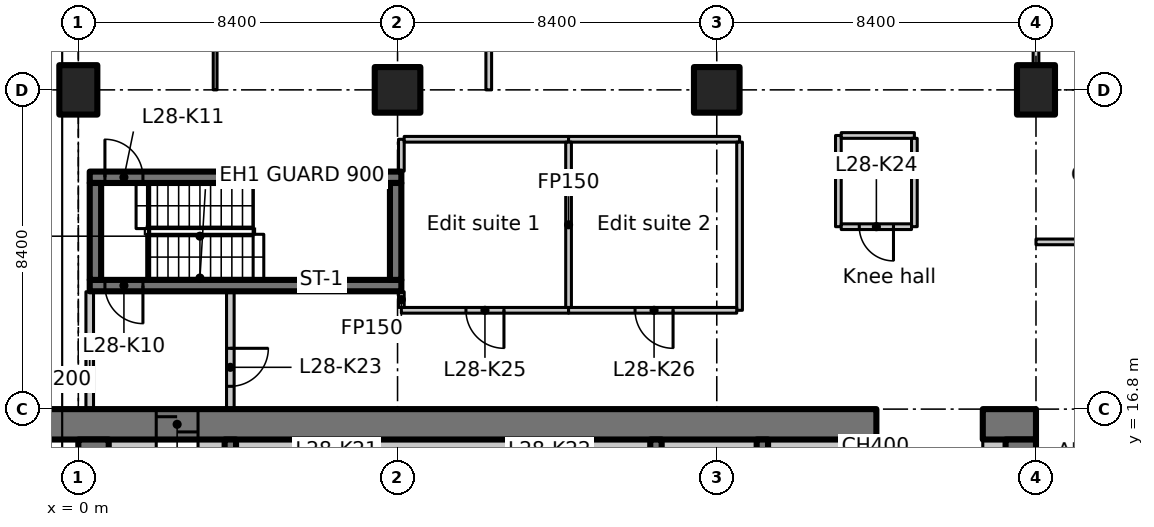
"""IFC4 building model, lengths in metres.
Left out: names, types, materials, properties, quantities, classifications, styles, units other than length and angle.
Written with IfcOpenShell. Run it as: python <this file> out.ifc"""

import sys

from ifc_helpers import new_model, si_unit, direction, frame, frame_2d, origin, origin_2d, place, context, subcontext, project, spatial, polyline, rectangle, outline, extrude, element, fill, save


model = new_model("IFC4")
c1 = context("Model", 3, precision=1e-05, world=origin(), true_north=direction((0.0, 1.0)))
c2 = subcontext(c1, "Body", "Model", "MODEL_VIEW")
j1 = project(units=[si_unit("LENGTHUNIT", "METRE"), si_unit("PLANEANGLEUNIT", "RADIAN")], contexts=[c1])
p1 = place(None, origin())
s1 = spatial("IfcSite", under=j1, at=p1, CompositionType="ELEMENT")
p2 = place(p1, origin())
s2 = spatial("IfcBuilding", under=s1, at=p2, CompositionType="ELEMENT")
p3 = place(p2, frame((0.0, 0.0, 116.9)))
s3 = spatial("IfcBuildingStorey", under=s2, at=p3, CompositionType="ELEMENT", Elevation=116.9)
p4 = place(p3, frame((0.0, 25.2, 0.0), z_axis=(0.0, 0.0, 1.0), x_axis=(1.0, 0.0, 0.0)))
e1 = element("IfcColumn", 1, at=p4, inside=s3, PredefinedType="COLUMN", context=c2, shape_type="SweptSolid", body=[
    extrude(rectangle(XDim=1.0, YDim=1.3, at=origin_2d()), origin(), (0.0, 0.0, 1.0), 3.35),
])
for number, where, z_axis, x_axis in (
    (2, (8.4, 25.2, 0.0), (0.0, 0.0, 1.0), (1.0, 0.0, 0.0)),
    (3, (16.8, 25.2, 0.0), (0.0, 0.0, 1.0), (1.0, 0.0, 0.0)),
):
    element("IfcColumn", number, at=place(p3, frame(where, z_axis=z_axis, x_axis=x_axis)), inside=s3, PredefinedType="COLUMN", context=c2, shape_type="SweptSolid", body=[
        extrude(rectangle(XDim=1.2, YDim=1.2, at=origin_2d()), origin(), (0.0, 0.0, 1.0), 3.35),
    ])
p5 = place(p3, frame((25.2, 25.2, 0.0), z_axis=(0.0, 0.0, 1.0), x_axis=(1.0, 0.0, 0.0)))
e4 = element("IfcColumn", 4, at=p5, inside=s3, PredefinedType="COLUMN", context=c2, shape_type="SweptSolid", body=[
    extrude(rectangle(XDim=1.0, YDim=1.3, at=origin_2d()), origin(), (0.0, 0.0, 1.0), 3.35),
])
p6 = place(p3, frame((-1.1, 16.4, 0.0), z_axis=(0.0, 0.0, 1.0), x_axis=(1.0, 0.0, 0.0)))
e5 = element("IfcWall", 5, at=p6, inside=s3, PredefinedType="SHEAR", context=c2, shape_type="SweptSolid", body=[
    extrude(rectangle(XDim=22.1, YDim=0.8, at=frame_2d((11.05, 0.0))), origin(), (0.0, 0.0, 1.0), 3.35),
])
p7 = place(p6, frame((3.15, 0.0, 0.0)))
e6 = element("IfcOpeningElement", 6, at=p7, cuts=e5, PredefinedType="OPENING", context=c2, shape_type="SweptSolid", body=[
    extrude(rectangle(XDim=1.1, YDim=2.3, at=frame_2d((0.55, 1.15))), frame((0.0, 0.41, 0.0), z_axis=(0.0, -1.0, 0.0), x_axis=(1.0, 0.0, 0.0)), (0.0, 0.0, 1.0), 0.82),
])
p8 = place(p3, frame((23.8, 16.4, 0.0), z_axis=(0.0, 0.0, 1.0), x_axis=(1.0, 0.0, 0.0)))
e7 = element("IfcWall", 7, at=p8, inside=s3, PredefinedType="SHEAR", context=c2, shape_type="SweptSolid", body=[
    extrude(rectangle(XDim=1.4, YDim=0.8, at=frame_2d((0.7, 0.0))), origin(), (0.0, 0.0, 1.0), 3.35),
])
p9 = place(p3, frame((0.4, 7.136, 0.0), z_axis=(0.0, 0.0, 1.0), x_axis=(0.0, 1.0, 0.0)))
e8 = element("IfcWall", 8, at=p9, inside=s3, PredefinedType="SHEAR", context=c2, shape_type="SweptSolid", body=[
    extrude(rectangle(XDim=8.864, YDim=0.8, at=frame_2d((4.432, 0.0))), origin(), (0.0, 0.0, 1.0), 3.35),
])
p10 = place(p3, frame((24.8, 12.6, 0.0), z_axis=(0.0, 0.0, 1.0), x_axis=(0.0, 1.0, 0.0)))
e9 = element("IfcWall", 9, at=p10, inside=s3, PredefinedType="SHEAR", context=c2, shape_type="SweptSolid", body=[
    extrude(rectangle(XDim=3.4, YDim=0.8, at=frame_2d((1.7, 0.0))), origin(), (0.0, 0.0, 1.0), 3.35),
])
p11 = place(p3, frame((0.8, 15.8, 0.0), z_axis=(0.0, 0.0, 1.0), x_axis=(1.0, 0.0, 0.0)))
e10 = element("IfcWall", 10, at=p11, inside=s3, PredefinedType="PARTITIONING", context=c2, shape_type="SweptSolid", body=[
    extrude(rectangle(XDim=1.25, YDim=0.4, at=frame_2d((0.625, 0.0))), origin(), (0.0, 0.0, 1.0), 3.35),
])
p12 = place(p3, frame((23.8, 15.8, 0.0), z_axis=(0.0, 0.0, 1.0), x_axis=(1.0, 0.0, 0.0)))
e11 = element("IfcWall", 11, at=p12, inside=s3, PredefinedType="PARTITIONING", context=c2, shape_type="SweptSolid", body=[
    extrude(rectangle(XDim=0.6, YDim=0.4, at=frame_2d((0.3, 0.0))), origin(), (0.0, 0.0, 1.0), 3.35),
])
for number, where, z_axis, x_axis in (
    (12, (4.0, 12.95, 0.0), (0.0, 0.0, 1.0), (0.0, 1.0, 0.0)),
    (13, (15.2, 12.95, 0.0), (0.0, 0.0, 1.0), (0.0, 1.0, 0.0)),
    (14, (18.0, 12.95, 0.0), (0.0, 0.0, 1.0), (0.0, 1.0, 0.0)),
    (15, (20.8, 12.95, 0.0), (0.0, 0.0, 1.0), (0.0, 1.0, 0.0)),
):
    element("IfcWall", number, at=place(p3, frame(where, z_axis=z_axis, x_axis=x_axis)), inside=s3, PredefinedType="SHEAR", context=c2, shape_type="SweptSolid", body=[
        extrude(rectangle(XDim=3.05, YDim=0.3, at=frame_2d((1.525, 0.0))), origin(), (0.0, 0.0, 1.0), 3.35),
    ])
p13 = place(p3, frame((8.5, 20.05, 0.0), z_axis=(0.0, 0.0, 1.0), x_axis=(-1.0, 0.0, 0.0)))
e16 = element("IfcWall", 16, at=p13, inside=s3, PredefinedType="SHEAR", context=c2, shape_type="SweptSolid", body=[
    extrude(rectangle(XDim=8.2, YDim=0.3, at=frame_2d((4.1, 0.0))), origin(), (0.0, 0.0, 1.0), 3.35),
])
p14 = place(p13, frame((6.8, 0.0, 0.0)))
e17 = element("IfcOpeningElement", 17, at=p14, cuts=e16, PredefinedType="OPENING", context=c2, shape_type="SweptSolid", body=[
    extrude(rectangle(XDim=1.0, YDim=2.1, at=frame_2d((0.5, 1.05))), frame((0.0, 0.16, 0.0), z_axis=(0.0, -1.0, 0.0), x_axis=(1.0, 0.0, 0.0)), (0.0, 0.0, 1.0), 0.32),
])
p15 = place(p3, frame((0.3, 22.9, 0.0), z_axis=(0.0, 0.0, 1.0), x_axis=(1.0, 0.0, 0.0)))
e18 = element("IfcWall", 18, at=p15, inside=s3, PredefinedType="SHEAR", context=c2, shape_type="SweptSolid", body=[
    extrude(rectangle(XDim=8.2, YDim=0.3, at=frame_2d((4.1, 0.0))), origin(), (0.0, 0.0, 1.0), 3.35),
])
p16 = place(p15, frame((0.4, 0.0, 0.0)))
e19 = element("IfcOpeningElement", 19, at=p16, cuts=e18, PredefinedType="OPENING", context=c2, shape_type="SweptSolid", body=[
    extrude(rectangle(XDim=1.0, YDim=2.1, at=frame_2d((0.5, 1.05))), frame((0.0, 0.16, 0.0), z_axis=(0.0, -1.0, 0.0), x_axis=(1.0, 0.0, 0.0)), (0.0, 0.0, 1.0), 0.32),
])
for number, where, z_axis, x_axis in (
    (20, (0.45, 20.2, 0.0), (0.0, 0.0, 1.0), (0.0, 1.0, 0.0)),
    (21, (8.35, 20.2, 0.0), (0.0, 0.0, 1.0), (0.0, 1.0, 0.0)),
):
    element("IfcWall", number, at=place(p3, frame(where, z_axis=z_axis, x_axis=x_axis)), inside=s3, PredefinedType="SHEAR", context=c2, shape_type="SweptSolid", body=[
        extrude(rectangle(XDim=2.55, YDim=0.3, at=frame_2d((1.275, 0.0))), origin(), (0.0, 0.0, 1.0), 3.35),
    ])
p17 = place(p3, frame((0.3, 16.812, 0.0), z_axis=(0.0, 0.0, 1.0), x_axis=(0.0, 1.0, 0.0)))
e22 = element("IfcWall", 22, at=p17, inside=s3, PredefinedType="PARTITIONING", context=c2, shape_type="SweptSolid", body=[
    extrude(rectangle(XDim=3.076, YDim=0.2, at=frame_2d((1.538, 0.0))), origin(), (0.0, 0.0, 1.0), 2.98),
])
p18 = place(p3, frame((4.0, 19.888, 0.0), z_axis=(0.0, 0.0, 1.0), x_axis=(0.0, -1.0, 0.0)))
e23 = element("IfcWall", 23, at=p18, inside=s3, PredefinedType="PARTITIONING", context=c2, shape_type="SweptSolid", body=[
    extrude(rectangle(XDim=3.076, YDim=0.2, at=frame_2d((1.538, 0.0))), origin(), (0.0, 0.0, 1.0), 3.35),
])
p19 = place(p18, frame((1.488, 0.0, 0.0)))
e24 = element("IfcOpeningElement", 24, at=p19, cuts=e23, PredefinedType="OPENING", context=c2, shape_type="SweptSolid", body=[
    extrude(rectangle(XDim=1.0, YDim=2.1, at=frame_2d((0.5, 1.05))), frame((0.0, 0.11, 0.0), z_axis=(0.0, -1.0, 0.0), x_axis=(1.0, 0.0, 0.0)), (0.0, 0.0, 1.0), 0.22),
])
p20 = place(p3, frame((12.9, 19.4, 0.0), z_axis=(0.0, 0.0, 1.0), x_axis=(-1.0, 0.0, 0.0)))
e25 = element("IfcWall", 25, at=p20, inside=s3, PredefinedType="PARTITIONING", context=c2, shape_type="SweptSolid", body=[
    extrude(rectangle(XDim=4.4, YDim=0.15, at=frame_2d((2.2, 0.0))), origin(), (0.0, 0.0, 1.0), 3.35),
])
p21 = place(p20, frame((1.7, 0.0, 0.0)))
e26 = element("IfcOpeningElement", 26, at=p21, cuts=e25, PredefinedType="OPENING", context=c2, shape_type="SweptSolid", body=[
    extrude(rectangle(XDim=1.0, YDim=2.1, at=frame_2d((0.5, 1.05))), frame((0.0, 0.085, 0.0), z_axis=(0.0, -1.0, 0.0), x_axis=(1.0, 0.0, 0.0)), (0.0, 0.0, 1.0), 0.17),
])
p22 = place(p3, frame((8.5, 19.475, 0.0), z_axis=(0.0, 0.0, 1.0), x_axis=(0.0, 1.0, 0.0)))
e27 = element("IfcWall", 27, at=p22, inside=s3, PredefinedType="PARTITIONING", context=c2, shape_type="SweptSolid", body=[
    extrude(rectangle(XDim=0.413, YDim=0.15, at=frame_2d((0.207, 0.0))), origin(), (0.0, 0.0, 1.0), 3.35),
])
p23 = place(p3, frame((8.5, 23.062, 0.0), z_axis=(0.0, 0.0, 1.0), x_axis=(0.0, 1.0, 0.0)))
e28 = element("IfcWall", 28, at=p23, inside=s3, PredefinedType="PARTITIONING", context=c2, shape_type="SweptSolid", body=[
    extrude(rectangle(XDim=0.838, YDim=0.15, at=frame_2d((0.419, 0.0))), origin(), (0.0, 0.0, 1.0), 3.35),
])
p24 = place(p3, frame((8.575, 23.9, 0.0), z_axis=(0.0, 0.0, 1.0), x_axis=(1.0, 0.0, 0.0)))
e29 = element("IfcWall", 29, at=p24, inside=s3, PredefinedType="PARTITIONING", context=c2, shape_type="SweptSolid", body=[
    extrude(rectangle(XDim=4.325, YDim=0.15, at=frame_2d((2.163, 0.0))), origin(), (0.0, 0.0, 1.0), 3.35),
])
p25 = place(p3, frame((12.9, 23.9, 0.0), z_axis=(0.0, 0.0, 1.0), x_axis=(1.0, 0.0, 0.0)))
e30 = element("IfcWall", 30, at=p25, inside=s3, PredefinedType="PARTITIONING", context=c2, shape_type="SweptSolid", body=[
    extrude(rectangle(XDim=4.5, YDim=0.15, at=frame_2d((2.25, 0.0))), origin(), (0.0, 0.0, 1.0), 3.35),
])
p26 = place(p3, frame((17.4, 23.825, 0.0), z_axis=(0.0, 0.0, 1.0), x_axis=(0.0, -1.0, 0.0)))
e31 = element("IfcWall", 31, at=p26, inside=s3, PredefinedType="PARTITIONING", context=c2, shape_type="SweptSolid", body=[
    extrude(rectangle(XDim=4.425, YDim=0.15, at=frame_2d((2.212, 0.0))), origin(), (0.0, 0.0, 1.0), 3.35),
])
p27 = place(p3, frame((17.325, 19.4, 0.0), z_axis=(0.0, 0.0, 1.0), x_axis=(-1.0, 0.0, 0.0)))
e32 = element("IfcWall", 32, at=p27, inside=s3, PredefinedType="PARTITIONING", context=c2, shape_type="SweptSolid", body=[
    extrude(rectangle(XDim=4.425, YDim=0.15, at=frame_2d((2.212, 0.0))), origin(), (0.0, 0.0, 1.0), 3.35),
])
p28 = place(p27, frame((1.675, 0.0, 0.0)))
e33 = element("IfcOpeningElement", 33, at=p28, cuts=e32, PredefinedType="OPENING", context=c2, shape_type="SweptSolid", body=[
    extrude(rectangle(XDim=1.0, YDim=2.1, at=frame_2d((0.5, 1.05))), frame((0.0, 0.085, 0.0), z_axis=(0.0, -1.0, 0.0), x_axis=(1.0, 0.0, 0.0)), (0.0, 0.0, 1.0), 0.17),
])
p29 = place(p3, frame((12.9, 23.825, 0.0), z_axis=(0.0, 0.0, 1.0), x_axis=(0.0, -1.0, 0.0)))
e34 = element("IfcWall", 34, at=p29, inside=s3, PredefinedType="PARTITIONING", context=c2, shape_type="SweptSolid", body=[
    extrude(rectangle(XDim=4.35, YDim=0.15, at=frame_2d((2.175, 0.0))), origin(), (0.0, 0.0, 1.0), 3.35),
])
p30 = place(p3, frame((20.0, 21.6, 0.0), z_axis=(0.0, 0.0, 1.0), x_axis=(0.0, 1.0, 0.0)))
e35 = element("IfcWall", 35, at=p30, inside=s3, PredefinedType="PARTITIONING", context=c2, shape_type="SweptSolid", body=[
    extrude(rectangle(XDim=2.4, YDim=0.15, at=frame_2d((1.2, 0.0))), origin(), (0.0, 0.0, 1.0), 3.35),
])
p31 = place(p3, frame((20.075, 24.0, 0.0), z_axis=(0.0, 0.0, 1.0), x_axis=(1.0, 0.0, 0.0)))
e36 = element("IfcWall", 36, at=p31, inside=s3, PredefinedType="PARTITIONING", context=c2, shape_type="SweptSolid", body=[
    extrude(rectangle(XDim=1.925, YDim=0.15, at=frame_2d((0.962, 0.0))), origin(), (0.0, 0.0, 1.0), 3.35),
])
p32 = place(p3, frame((22.0, 23.925, 0.0), z_axis=(0.0, 0.0, 1.0), x_axis=(0.0, -1.0, 0.0)))
e37 = element("IfcWall", 37, at=p32, inside=s3, PredefinedType="PARTITIONING", context=c2, shape_type="SweptSolid", body=[
    extrude(rectangle(XDim=2.325, YDim=0.15, at=frame_2d((1.163, 0.0))), origin(), (0.0, 0.0, 1.0), 3.35),
])
p33 = place(p3, frame((21.925, 21.6, 0.0), z_axis=(0.0, 0.0, 1.0), x_axis=(-1.0, 0.0, 0.0)))
e38 = element("IfcWall", 38, at=p33, inside=s3, PredefinedType="PARTITIONING", context=c2, shape_type="SweptSolid", body=[
    extrude(rectangle(XDim=1.85, YDim=0.15, at=frame_2d((0.925, 0.0))), origin(), (0.0, 0.0, 1.0), 3.35),
])
p34 = place(p33, frame((0.475, 0.0, 0.0)))
e39 = element("IfcOpeningElement", 39, at=p34, cuts=e38, PredefinedType="OPENING", context=c2, shape_type="SweptSolid", body=[
    extrude(rectangle(XDim=0.9, YDim=2.1, at=frame_2d((0.45, 1.05))), frame((0.0, 0.085, 0.0), z_axis=(0.0, -1.0, 0.0), x_axis=(1.0, 0.0, 0.0)), (0.0, 0.0, 1.0), 0.17),
])
p35 = place(p3, frame((3.15, 15.8, 0.0), z_axis=(0.0, 0.0, 1.0), x_axis=(1.0, 0.0, 0.0)))
e40 = element("IfcWall", 40, at=p35, inside=s3, PredefinedType="PARTITIONING", context=c2, shape_type="SweptSolid", body=[
    extrude(rectangle(XDim=0.7, YDim=0.4, at=frame_2d((0.35, 0.0))), origin(), (0.0, 0.0, 1.0), 3.35),
])
p36 = place(p3, frame((4.15, 15.8, 0.0), z_axis=(0.0, 0.0, 1.0), x_axis=(1.0, 0.0, 0.0)))
e41 = element("IfcWall", 41, at=p36, inside=s3, PredefinedType="PARTITIONING", context=c2, shape_type="SweptSolid", body=[
    extrude(rectangle(XDim=10.9, YDim=0.4, at=frame_2d((5.45, 0.0))), origin(), (0.0, 0.0, 1.0), 3.35),
])
for number, where, z_axis, x_axis in (
    (42, (15.35, 15.8, 0.0), (0.0, 0.0, 1.0), (1.0, 0.0, 0.0)),
    (43, (18.15, 15.8, 0.0), (0.0, 0.0, 1.0), (1.0, 0.0, 0.0)),
):
    element("IfcWall", number, at=place(p3, frame(where, z_axis=z_axis, x_axis=x_axis)), inside=s3, PredefinedType="PARTITIONING", context=c2, shape_type="SweptSolid", body=[
        extrude(rectangle(XDim=2.5, YDim=0.4, at=frame_2d((1.25, 0.0))), origin(), (0.0, 0.0, 1.0), 3.35),
    ])
p37 = place(p3, frame((20.95, 15.8, 0.0), z_axis=(0.0, 0.0, 1.0), x_axis=(1.0, 0.0, 0.0)))
e44 = element("IfcWall", 44, at=p37, inside=s3, PredefinedType="PARTITIONING", context=c2, shape_type="SweptSolid", body=[
    extrude(rectangle(XDim=0.05, YDim=0.4, at=frame_2d((0.025, 0.0))), origin(), (0.0, 0.0, 1.0), 3.35),
])
p38 = place(p3, frame((25.2, 21.2, 0.0), z_axis=(0.0, 0.0, 1.0), x_axis=(1.0, 0.0, 0.0)))
e45 = element("IfcWall", 45, at=p38, inside=s3, PredefinedType="PARTITIONING", context=c2, shape_type="SweptSolid", body=[
    extrude(rectangle(XDim=4.2, YDim=0.15, at=frame_2d((2.1, 0.0))), origin(), (0.0, 0.0, 1.0), 3.33),
])
p39 = place(p3, frame((25.2, 31.0, 0.0), z_axis=(0.0, 0.0, 1.0), x_axis=(0.0, -1.0, 0.0)))
e46 = element("IfcWall", 46, at=p39, inside=s3, PredefinedType="PARTITIONING", context=c2, shape_type="SweptSolid", body=[
    extrude(outline(polyline([(0.0, 0.0), (5.13, 0.0), (5.13, 2.98), (0.0, 2.98), (0.0, 0.0)])), frame((0.0, 0.075, 0.0), z_axis=(0.0, -1.0, 0.0), x_axis=(1.0, 0.0, 0.0)), (0.0, 0.0, 1.0), 0.15),
])
p40 = place(p39, frame((1.93, 0.0, 0.0)))
e47 = element("IfcOpeningElement", 47, at=p40, cuts=e46, PredefinedType="OPENING", context=c2, shape_type="SweptSolid", body=[
    extrude(rectangle(XDim=1.1, YDim=2.1, at=frame_2d((0.55, 1.05))), frame((0.0, 0.085, 0.0), z_axis=(0.0, -1.0, 0.0), x_axis=(1.0, 0.0, 0.0)), (0.0, 0.0, 1.0), 0.17),
])
p41 = place(p3, frame((10.8, 25.2, 0.0), z_axis=(0.0, 0.0, 1.0), x_axis=(0.0, 1.0, 0.0)))
e48 = element("IfcWall", 48, at=p41, inside=s3, PredefinedType="PARTITIONING", context=c2, shape_type="SweptSolid", body=[
    extrude(rectangle(XDim=4.2, YDim=0.15, at=frame_2d((2.1, 0.0))), origin(), (0.0, 0.0, 1.0), 3.33),
])
p42 = place(p3, frame((3.6, 29.4, 0.0), z_axis=(0.0, 0.0, 1.0), x_axis=(0.0, -1.0, 0.0)))
e49 = element("IfcWall", 49, at=p42, inside=s3, PredefinedType="PARTITIONING", context=c2, shape_type="SweptSolid", body=[
    extrude(rectangle(XDim=4.2, YDim=0.1, at=frame_2d((2.1, 0.0))), origin(), (0.0, 0.0, 1.0), 3.33),
])
p43 = place(p7, origin())
e50 = element("IfcDoor", 50, at=p43, inside=s3, OperationType="SLIDING_TO_LEFT", PredefinedType="DOOR", context=c2, shape_type="SweptSolid", body=[
    extrude(rectangle(XDim=1.1, YDim=2.3, at=frame_2d((0.55, 1.15))), frame((0.0, 0.025, 0.0), z_axis=(0.0, -1.0, 0.0), x_axis=(1.0, 0.0, 0.0)), (0.0, 0.0, 1.0), 0.05),
])
fill(e6, e50)
p44 = place(p14, origin())
e51 = element("IfcDoor", 51, at=p44, inside=s3, OperationType="SINGLE_SWING_RIGHT", PredefinedType="DOOR", context=c2, shape_type="SweptSolid", body=[
    extrude(rectangle(XDim=1.0, YDim=2.1, at=frame_2d((0.5, 1.05))), frame((0.0, 0.025, 0.0), z_axis=(0.0, -1.0, 0.0), x_axis=(1.0, 0.0, 0.0)), (0.0, 0.0, 1.0), 0.05),
])
fill(e17, e51)
p45 = place(p16, origin())
e52 = element("IfcDoor", 52, at=p45, inside=s3, OperationType="SINGLE_SWING_LEFT", PredefinedType="DOOR", context=c2, shape_type="SweptSolid", body=[
    extrude(rectangle(XDim=1.0, YDim=2.1, at=frame_2d((0.5, 1.05))), frame((0.0, 0.025, 0.0), z_axis=(0.0, -1.0, 0.0), x_axis=(1.0, 0.0, 0.0)), (0.0, 0.0, 1.0), 0.05),
])
fill(e19, e52)
p46 = place(p19, origin())
e53 = element("IfcDoor", 53, at=p46, inside=s3, OperationType="SINGLE_SWING_LEFT", PredefinedType="DOOR", context=c2, shape_type="SweptSolid", body=[
    extrude(rectangle(XDim=1.0, YDim=2.1, at=frame_2d((0.5, 1.05))), frame((0.0, 0.025, 0.0), z_axis=(0.0, -1.0, 0.0), x_axis=(1.0, 0.0, 0.0)), (0.0, 0.0, 1.0), 0.05),
])
fill(e24, e53)
p47 = place(p34, origin())
e54 = element("IfcDoor", 54, at=p47, inside=s3, OperationType="SINGLE_SWING_RIGHT", PredefinedType="DOOR", context=c2, shape_type="SweptSolid", body=[
    extrude(rectangle(XDim=0.9, YDim=2.1, at=frame_2d((0.45, 1.05))), frame((0.0, 0.025, 0.0), z_axis=(0.0, -1.0, 0.0), x_axis=(1.0, 0.0, 0.0)), (0.0, 0.0, 1.0), 0.05),
])
fill(e39, e54)
p48 = place(p21, origin())
e55 = element("IfcDoor", 55, at=p48, inside=s3, OperationType="SINGLE_SWING_LEFT", PredefinedType="DOOR", context=c2, shape_type="SweptSolid", body=[
    extrude(rectangle(XDim=1.0, YDim=2.1, at=frame_2d((0.5, 1.05))), frame((0.0, 0.025, 0.0), z_axis=(0.0, -1.0, 0.0), x_axis=(1.0, 0.0, 0.0)), (0.0, 0.0, 1.0), 0.05),
])
fill(e26, e55)
p49 = place(p28, origin())
e56 = element("IfcDoor", 56, at=p49, inside=s3, OperationType="SINGLE_SWING_RIGHT", PredefinedType="DOOR", context=c2, shape_type="SweptSolid", body=[
    extrude(rectangle(XDim=1.0, YDim=2.1, at=frame_2d((0.5, 1.05))), frame((0.0, 0.025, 0.0), z_axis=(0.0, -1.0, 0.0), x_axis=(1.0, 0.0, 0.0)), (0.0, 0.0, 1.0), 0.05),
])
fill(e33, e56)
save(model, sys.argv[1])
